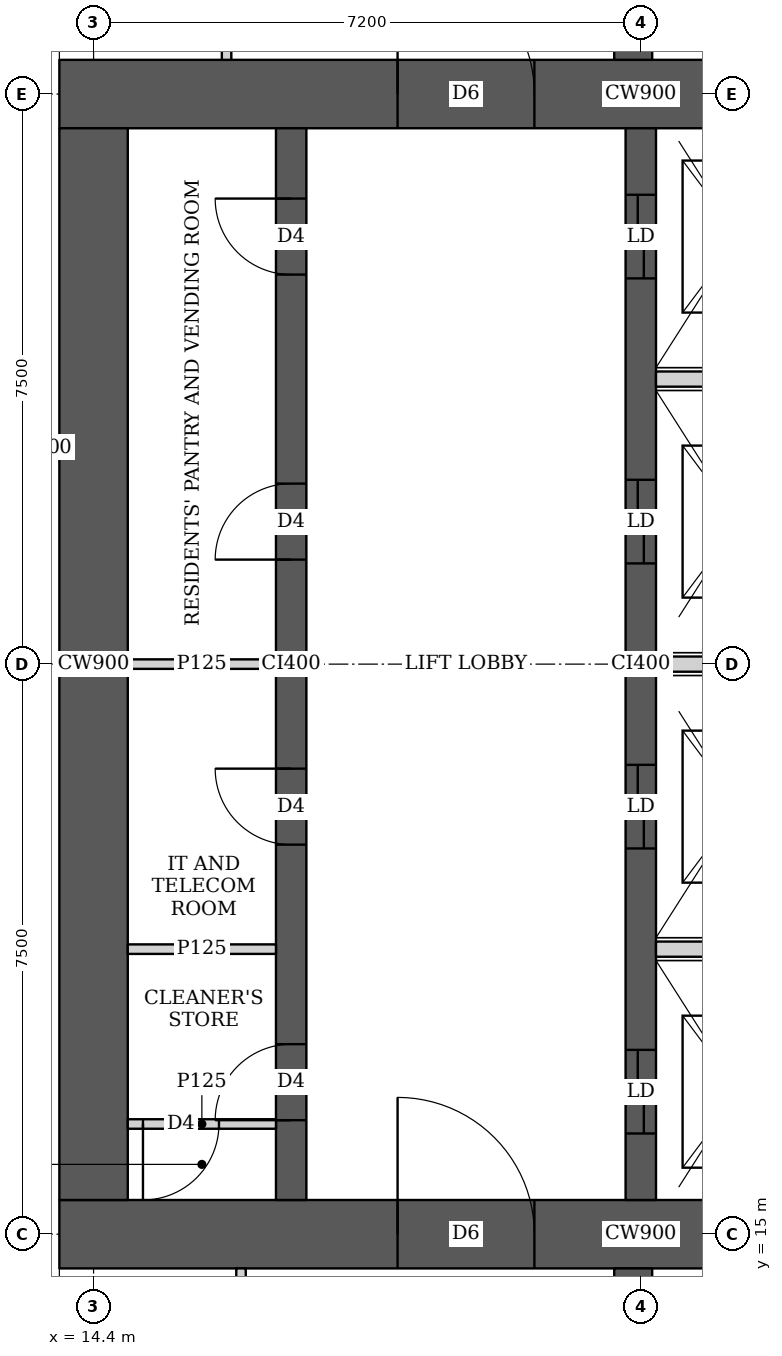
"""IFC4 building model, lengths in metres.
Left out: names, types, materials, properties, quantities, classifications, styles, units other than length and angle.
Written with IfcOpenShell. Run it as: python <this file> out.ifc"""

import sys

from ifc_helpers import new_model, si_unit, direction, frame, frame_2d, origin, place, context, subcontext, project, spatial, rectangle, extrude, element, fill, save


model = new_model("IFC4")
c1 = context("Model", 3, precision=1e-05, world=origin(), true_north=direction((0.0, 1.0)))
c2 = subcontext(c1, "Body", "Model", "MODEL_VIEW")
j1 = project(units=[si_unit("LENGTHUNIT", "METRE"), si_unit("PLANEANGLEUNIT", "RADIAN")], contexts=[c1])
p1 = place(None, origin())
s1 = spatial("IfcSite", under=j1, at=p1, CompositionType="ELEMENT")
p2 = place(p1, origin())
s2 = spatial("IfcBuilding", under=s1, at=p2, CompositionType="ELEMENT")
p3 = place(p2, frame((0.0, 0.0, 259.1)))
s3 = spatial("IfcBuildingStorey", under=s2, at=p3, CompositionType="ELEMENT", Elevation=259.1)
p4 = place(p3, frame((13.95, 15.0, 0.0), z_axis=(0.0, 0.0, 1.0), x_axis=(1.0, 0.0, 0.0)))
e1 = element("IfcWall", 1, at=p4, inside=s3, PredefinedType="SHEAR", context=c2, shape_type="SweptSolid", body=[
    extrude(rectangle(XDim=15.3, YDim=0.9, at=frame_2d((7.65, 0.0))), origin(), (0.0, 0.0, 1.0), 3.75),
])
p5 = place(p4, frame((4.45, 0.0, 0.0)))
e2 = element("IfcOpeningElement", 2, at=p5, cuts=e1, PredefinedType="OPENING", context=c2, shape_type="SweptSolid", body=[
    extrude(rectangle(XDim=1.8, YDim=2.1, at=frame_2d((0.9, 1.05))), frame((0.0, 0.46, 0.0), z_axis=(0.0, -1.0, 0.0), x_axis=(1.0, 0.0, 0.0)), (0.0, 0.0, 1.0), 0.92),
])
p6 = place(p4, frame((10.7, 0.0, 0.0)))
e3 = element("IfcOpeningElement", 3, at=p6, cuts=e1, PredefinedType="OPENING", context=c2, shape_type="SweptSolid", body=[
    extrude(rectangle(XDim=1.1, YDim=2.1, at=frame_2d((0.55, 1.05))), frame((0.0, 0.46, 0.0), z_axis=(0.0, -1.0, 0.0), x_axis=(1.0, 0.0, 0.0)), (0.0, 0.0, 1.0), 0.92),
])
p7 = place(p3, frame((13.95, 30.0, 0.0), z_axis=(0.0, 0.0, 1.0), x_axis=(1.0, 0.0, 0.0)))
e4 = element("IfcWall", 4, at=p7, inside=s3, PredefinedType="SHEAR", context=c2, shape_type="SweptSolid", body=[
    extrude(rectangle(XDim=15.3, YDim=0.9, at=frame_2d((7.65, 0.0))), origin(), (0.0, 0.0, 1.0), 3.75),
])
p8 = place(p7, frame((4.45, 0.0, 0.0)))
e5 = element("IfcOpeningElement", 5, at=p8, cuts=e4, PredefinedType="OPENING", context=c2, shape_type="SweptSolid", body=[
    extrude(rectangle(XDim=1.8, YDim=2.1, at=frame_2d((0.9, 1.05))), frame((0.0, 0.46, 0.0), z_axis=(0.0, -1.0, 0.0), x_axis=(1.0, 0.0, 0.0)), (0.0, 0.0, 1.0), 0.92),
])
p9 = place(p7, frame((10.7, 0.0, 0.0)))
e6 = element("IfcOpeningElement", 6, at=p9, cuts=e4, PredefinedType="OPENING", context=c2, shape_type="SweptSolid", body=[
    extrude(rectangle(XDim=1.1, YDim=2.1, at=frame_2d((0.55, 1.05))), frame((0.0, 0.46, 0.0), z_axis=(0.0, -1.0, 0.0), x_axis=(1.0, 0.0, 0.0)), (0.0, 0.0, 1.0), 0.92),
])
p10 = place(p3, frame((14.4, 15.45, 0.0), z_axis=(0.0, 0.0, 1.0), x_axis=(0.0, 1.0, 0.0)))
e7 = element("IfcWall", 7, at=p10, inside=s3, PredefinedType="SHEAR", context=c2, shape_type="SweptSolid", body=[
    extrude(rectangle(XDim=14.1, YDim=0.9, at=frame_2d((7.05, 0.0))), origin(), (0.0, 0.0, 1.0), 3.75),
])
p11 = place(p3, frame((17.0, 15.45, 0.0), z_axis=(0.0, 0.0, 1.0), x_axis=(0.0, 1.0, 0.0)))
e8 = element("IfcWall", 8, at=p11, inside=s3, PredefinedType="SHEAR", context=c2, shape_type="SweptSolid", body=[
    extrude(rectangle(XDim=14.1, YDim=0.4, at=frame_2d((7.05, 0.0))), origin(), (0.0, 0.0, 1.0), 3.75),
])
p12 = place(p11, frame((1.05, 0.0, 0.0)))
e9 = element("IfcOpeningElement", 9, at=p12, cuts=e8, PredefinedType="OPENING", context=c2, shape_type="SweptSolid", body=[
    extrude(rectangle(XDim=1.0, YDim=2.1, at=frame_2d((0.5, 1.05))), frame((0.0, 0.21, 0.0), z_axis=(0.0, -1.0, 0.0), x_axis=(1.0, 0.0, 0.0)), (0.0, 0.0, 1.0), 0.42),
])
p13 = place(p11, frame((4.675, 0.0, 0.0)))
e10 = element("IfcOpeningElement", 10, at=p13, cuts=e8, PredefinedType="OPENING", context=c2, shape_type="SweptSolid", body=[
    extrude(rectangle(XDim=1.0, YDim=2.1, at=frame_2d((0.5, 1.05))), frame((0.0, 0.21, 0.0), z_axis=(0.0, -1.0, 0.0), x_axis=(1.0, 0.0, 0.0)), (0.0, 0.0, 1.0), 0.42),
])
p14 = place(p11, frame((8.425, 0.0, 0.0)))
e11 = element("IfcOpeningElement", 11, at=p14, cuts=e8, PredefinedType="OPENING", context=c2, shape_type="SweptSolid", body=[
    extrude(rectangle(XDim=1.0, YDim=2.1, at=frame_2d((0.5, 1.05))), frame((0.0, 0.21, 0.0), z_axis=(0.0, -1.0, 0.0), x_axis=(1.0, 0.0, 0.0)), (0.0, 0.0, 1.0), 0.42),
])
p15 = place(p11, frame((12.175, 0.0, 0.0)))
e12 = element("IfcOpeningElement", 12, at=p15, cuts=e8, PredefinedType="OPENING", context=c2, shape_type="SweptSolid", body=[
    extrude(rectangle(XDim=1.0, YDim=2.1, at=frame_2d((0.5, 1.05))), frame((0.0, 0.21, 0.0), z_axis=(0.0, -1.0, 0.0), x_axis=(1.0, 0.0, 0.0)), (0.0, 0.0, 1.0), 0.42),
])
p16 = place(p3, frame((21.6, 15.45, 0.0), z_axis=(0.0, 0.0, 1.0), x_axis=(0.0, 1.0, 0.0)))
e13 = element("IfcWall", 13, at=p16, inside=s3, PredefinedType="SHEAR", context=c2, shape_type="SweptSolid", body=[
    extrude(rectangle(XDim=14.1, YDim=0.4, at=frame_2d((7.05, 0.0))), origin(), (0.0, 0.0, 1.0), 3.75),
])
p17 = place(p16, frame((0.875, 0.0, 0.0)))
e14 = element("IfcOpeningElement", 14, at=p17, cuts=e13, PredefinedType="OPENING", context=c2, shape_type="SweptSolid", body=[
    extrude(rectangle(XDim=1.1, YDim=2.1, at=frame_2d((0.55, 1.05))), frame((0.0, 0.21, 0.0), z_axis=(0.0, -1.0, 0.0), x_axis=(1.0, 0.0, 0.0)), (0.0, 0.0, 1.0), 0.42),
])
p18 = place(p16, frame((4.625, 0.0, 0.0)))
e15 = element("IfcOpeningElement", 15, at=p18, cuts=e13, PredefinedType="OPENING", context=c2, shape_type="SweptSolid", body=[
    extrude(rectangle(XDim=1.1, YDim=2.1, at=frame_2d((0.55, 1.05))), frame((0.0, 0.21, 0.0), z_axis=(0.0, -1.0, 0.0), x_axis=(1.0, 0.0, 0.0)), (0.0, 0.0, 1.0), 0.42),
])
p19 = place(p16, frame((8.375, 0.0, 0.0)))
e16 = element("IfcOpeningElement", 16, at=p19, cuts=e13, PredefinedType="OPENING", context=c2, shape_type="SweptSolid", body=[
    extrude(rectangle(XDim=1.1, YDim=2.1, at=frame_2d((0.55, 1.05))), frame((0.0, 0.21, 0.0), z_axis=(0.0, -1.0, 0.0), x_axis=(1.0, 0.0, 0.0)), (0.0, 0.0, 1.0), 0.42),
])
p20 = place(p16, frame((12.125, 0.0, 0.0)))
e17 = element("IfcOpeningElement", 17, at=p20, cuts=e13, PredefinedType="OPENING", context=c2, shape_type="SweptSolid", body=[
    extrude(rectangle(XDim=1.1, YDim=2.1, at=frame_2d((0.55, 1.05))), frame((0.0, 0.21, 0.0), z_axis=(0.0, -1.0, 0.0), x_axis=(1.0, 0.0, 0.0)), (0.0, 0.0, 1.0), 0.42),
])
for number, where, z_axis, x_axis in (
    (18, (21.5, 10.35, 0.0), (0.0, 0.0, 1.0), (0.0, 1.0, 0.0)),
    (19, (21.5, 30.45, 0.0), (0.0, 0.0, 1.0), (0.0, 1.0, 0.0)),
):
    element("IfcWall", number, at=place(p3, frame(where, z_axis=z_axis, x_axis=x_axis)), inside=s3, PredefinedType="SHEAR", context=c2, shape_type="SweptSolid", body=[
        extrude(rectangle(XDim=4.2, YDim=0.5, at=frame_2d((2.1, 0.0))), origin(), (0.0, 0.0, 1.0), 3.75),
    ])
p21 = place(p3, frame((16.34, 10.562, 0.0), z_axis=(0.0, 0.0, 1.0), x_axis=(0.0, 1.0, 0.0)))
e20 = element("IfcWall", 20, at=p21, inside=s3, PredefinedType="PARTITIONING", context=c2, shape_type="SweptSolid", body=[
    extrude(rectangle(XDim=3.988, YDim=0.125, at=frame_2d((1.994, 0.0))), origin(), (0.0, 0.0, 1.0), 3.5),
])
p22 = place(p21, frame((1.438, 0.0, 0.0)))
e21 = element("IfcOpeningElement", 21, at=p22, cuts=e20, PredefinedType="OPENING", context=c2, shape_type="SweptSolid", body=[
    extrude(rectangle(XDim=1.0, YDim=2.1, at=frame_2d((0.5, 1.05))), frame((0.0, 0.073, 0.0), z_axis=(0.0, -1.0, 0.0), x_axis=(1.0, 0.0, 0.0)), (0.0, 0.0, 1.0), 0.145),
])
p23 = place(p3, frame((16.15, 30.45, 0.0), z_axis=(0.0, 0.0, 1.0), x_axis=(0.0, 1.0, 0.0)))
e22 = element("IfcWall", 22, at=p23, inside=s3, PredefinedType="PARTITIONING", context=c2, shape_type="SweptSolid", body=[
    extrude(rectangle(XDim=4.387, YDim=0.125, at=frame_2d((2.193, 0.0))), origin(), (0.0, 0.0, 1.0), 3.5),
])
p24 = place(p23, frame((1.75, 0.0, 0.0)))
e23 = element("IfcOpeningElement", 23, at=p24, cuts=e22, PredefinedType="OPENING", context=c2, shape_type="SweptSolid", body=[
    extrude(rectangle(XDim=1.0, YDim=2.1, at=frame_2d((0.5, 1.05))), frame((0.0, 0.073, 0.0), z_axis=(0.0, -1.0, 0.0), x_axis=(1.0, 0.0, 0.0)), (0.0, 0.0, 1.0), 0.145),
])
p25 = place(p3, frame((14.85, 16.45, 0.0), z_axis=(0.0, 0.0, 1.0), x_axis=(1.0, 0.0, 0.0)))
e24 = element("IfcWall", 24, at=p25, inside=s3, PredefinedType="PARTITIONING", context=c2, shape_type="SweptSolid", body=[
    extrude(rectangle(XDim=1.95, YDim=0.125, at=frame_2d((0.975, 0.0))), origin(), (0.0, 0.0, 1.0), 3.5),
])
p26 = place(p25, frame((0.2, 0.0, 0.0)))
e25 = element("IfcOpeningElement", 25, at=p26, cuts=e24, PredefinedType="OPENING", context=c2, shape_type="SweptSolid", body=[
    extrude(rectangle(XDim=1.0, YDim=2.1, at=frame_2d((0.5, 1.05))), frame((0.0, 0.073, 0.0), z_axis=(0.0, -1.0, 0.0), x_axis=(1.0, 0.0, 0.0)), (0.0, 0.0, 1.0), 0.145),
])
for number, where, z_axis, x_axis in (
    (26, (14.85, 18.75, 0.0), (0.0, 0.0, 1.0), (1.0, 0.0, 0.0)),
    (27, (14.85, 22.5, 0.0), (0.0, 0.0, 1.0), (1.0, 0.0, 0.0)),
):
    element("IfcWall", number, at=place(p3, frame(where, z_axis=z_axis, x_axis=x_axis)), inside=s3, PredefinedType="PARTITIONING", context=c2, shape_type="SweptSolid", body=[
        extrude(rectangle(XDim=1.95, YDim=0.125, at=frame_2d((0.975, 0.0))), origin(), (0.0, 0.0, 1.0), 3.5),
    ])
for number, where, z_axis, x_axis in (
    (28, (21.8, 18.75, 0.0), (0.0, 0.0, 1.0), (1.0, 0.0, 0.0)),
    (29, (21.8, 22.5, 0.0), (0.0, 0.0, 1.0), (1.0, 0.0, 0.0)),
    (30, (21.8, 26.25, 0.0), (0.0, 0.0, 1.0), (1.0, 0.0, 0.0)),
):
    element("IfcWall", number, at=place(p3, frame(where, z_axis=z_axis, x_axis=x_axis)), inside=s3, PredefinedType="SOLIDWALL", context=c2, shape_type="SweptSolid", body=[
        extrude(rectangle(XDim=2.2, YDim=0.2, at=frame_2d((1.1, 0.0))), origin(), (0.0, 0.0, 1.0), 3.5),
    ])
p27 = place(p26, origin())
e31 = element("IfcDoor", 31, at=p27, inside=s3, OperationType="SINGLE_SWING_RIGHT", PredefinedType="DOOR", context=c2, shape_type="SweptSolid", body=[
    extrude(rectangle(XDim=1.0, YDim=2.1, at=frame_2d((0.5, 1.05))), frame((0.0, 0.025, 0.0), z_axis=(0.0, -1.0, 0.0), x_axis=(1.0, 0.0, 0.0)), (0.0, 0.0, 1.0), 0.05),
])
fill(e25, e31)
p28 = place(p12, origin())
e32 = element("IfcDoor", 32, at=p28, inside=s3, OperationType="SINGLE_SWING_LEFT", PredefinedType="DOOR", context=c2, shape_type="SweptSolid", body=[
    extrude(rectangle(XDim=1.0, YDim=2.1, at=frame_2d((0.5, 1.05))), frame((0.0, 0.025, 0.0), z_axis=(0.0, -1.0, 0.0), x_axis=(1.0, 0.0, 0.0)), (0.0, 0.0, 1.0), 0.05),
])
fill(e9, e32)
p29 = place(p13, origin())
e33 = element("IfcDoor", 33, at=p29, inside=s3, OperationType="SINGLE_SWING_RIGHT", PredefinedType="DOOR", context=c2, shape_type="SweptSolid", body=[
    extrude(rectangle(XDim=1.0, YDim=2.1, at=frame_2d((0.5, 1.05))), frame((0.0, 0.025, 0.0), z_axis=(0.0, -1.0, 0.0), x_axis=(1.0, 0.0, 0.0)), (0.0, 0.0, 1.0), 0.05),
])
fill(e10, e33)
p30 = place(p14, origin())
e34 = element("IfcDoor", 34, at=p30, inside=s3, OperationType="SINGLE_SWING_LEFT", PredefinedType="DOOR", context=c2, shape_type="SweptSolid", body=[
    extrude(rectangle(XDim=1.0, YDim=2.1, at=frame_2d((0.5, 1.05))), frame((0.0, 0.025, 0.0), z_axis=(0.0, -1.0, 0.0), x_axis=(1.0, 0.0, 0.0)), (0.0, 0.0, 1.0), 0.05),
])
fill(e11, e34)
p31 = place(p15, origin())
e35 = element("IfcDoor", 35, at=p31, inside=s3, OperationType="SINGLE_SWING_RIGHT", PredefinedType="DOOR", context=c2, shape_type="SweptSolid", body=[
    extrude(rectangle(XDim=1.0, YDim=2.1, at=frame_2d((0.5, 1.05))), frame((0.0, 0.025, 0.0), z_axis=(0.0, -1.0, 0.0), x_axis=(1.0, 0.0, 0.0)), (0.0, 0.0, 1.0), 0.05),
])
fill(e12, e35)
p32 = place(p5, origin())
e36 = element("IfcDoor", 36, at=p32, inside=s3, OperationType="DOUBLE_DOOR_SINGLE_SWING", PredefinedType="DOOR", context=c2, shape_type="SweptSolid", body=[
    extrude(rectangle(XDim=1.8, YDim=2.1, at=frame_2d((0.9, 1.05))), frame((0.0, 0.025, 0.0), z_axis=(0.0, -1.0, 0.0), x_axis=(1.0, 0.0, 0.0)), (0.0, 0.0, 1.0), 0.05),
])
fill(e2, e36)
p33 = place(p8, origin())
e37 = element("IfcDoor", 37, at=p33, inside=s3, OperationType="DOUBLE_DOOR_SINGLE_SWING", PredefinedType="DOOR", context=c2, shape_type="SweptSolid", body=[
    extrude(rectangle(XDim=1.8, YDim=2.1, at=frame_2d((0.9, 1.05))), frame((0.0, 0.025, 0.0), z_axis=(0.0, -1.0, 0.0), x_axis=(1.0, 0.0, 0.0)), (0.0, 0.0, 1.0), 0.05),
])
fill(e5, e37)
p34 = place(p17, origin())
e38 = element("IfcDoor", 38, at=p34, inside=s3, OperationType="DOUBLE_DOOR_SLIDING", PredefinedType="DOOR", context=c2, shape_type="SweptSolid", body=[
    extrude(rectangle(XDim=1.1, YDim=2.1, at=frame_2d((0.55, 1.05))), frame((0.0, 0.025, 0.0), z_axis=(0.0, -1.0, 0.0), x_axis=(1.0, 0.0, 0.0)), (0.0, 0.0, 1.0), 0.05),
])
fill(e14, e38)
p35 = place(p18, origin())
e39 = element("IfcDoor", 39, at=p35, inside=s3, OperationType="DOUBLE_DOOR_SLIDING", PredefinedType="DOOR", context=c2, shape_type="SweptSolid", body=[
    extrude(rectangle(XDim=1.1, YDim=2.1, at=frame_2d((0.55, 1.05))), frame((0.0, 0.025, 0.0), z_axis=(0.0, -1.0, 0.0), x_axis=(1.0, 0.0, 0.0)), (0.0, 0.0, 1.0), 0.05),
])
fill(e15, e39)
p36 = place(p19, origin())
e40 = element("IfcDoor", 40, at=p36, inside=s3, OperationType="DOUBLE_DOOR_SLIDING", PredefinedType="DOOR", context=c2, shape_type="SweptSolid", body=[
    extrude(rectangle(XDim=1.1, YDim=2.1, at=frame_2d((0.55, 1.05))), frame((0.0, 0.025, 0.0), z_axis=(0.0, -1.0, 0.0), x_axis=(1.0, 0.0, 0.0)), (0.0, 0.0, 1.0), 0.05),
])
fill(e16, e40)
p37 = place(p20, origin())
e41 = element("IfcDoor", 41, at=p37, inside=s3, OperationType="DOUBLE_DOOR_SLIDING", PredefinedType="DOOR", context=c2, shape_type="SweptSolid", body=[
    extrude(rectangle(XDim=1.1, YDim=2.1, at=frame_2d((0.55, 1.05))), frame((0.0, 0.025, 0.0), z_axis=(0.0, -1.0, 0.0), x_axis=(1.0, 0.0, 0.0)), (0.0, 0.0, 1.0), 0.05),
])
fill(e17, e41)
save(model, sys.argv[1])
